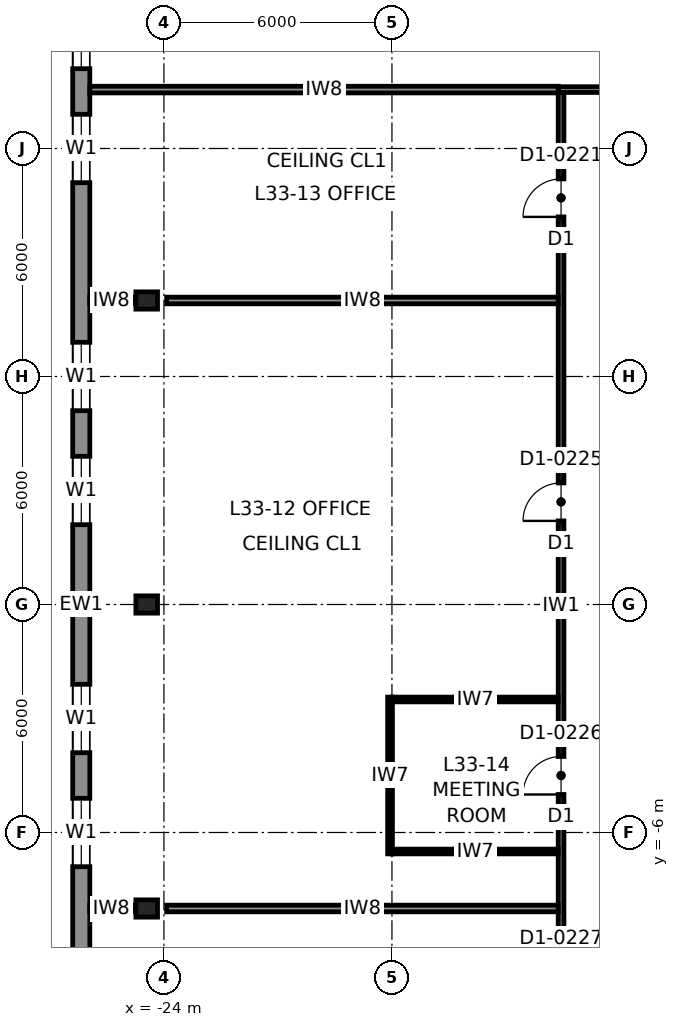
"""IFC4 building model, lengths in metres.
Left out: names, types, materials, properties, quantities, classifications, styles, units other than length and angle.
Written with IfcOpenShell. Run it as: python <this file> out.ifc"""

import sys

from ifc_helpers import new_model, si_unit, direction, frame, frame_2d, origin, origin_2d, place, context, subcontext, project, spatial, rectangle, i_section, extrude, element, fill, save


model = new_model("IFC4")
c1 = context("Model", 3, precision=1e-05, world=origin(), true_north=direction((0.0, 1.0)))
c2 = subcontext(c1, "Body", "Model", "MODEL_VIEW")
j1 = project(units=[si_unit("LENGTHUNIT", "METRE"), si_unit("PLANEANGLEUNIT", "RADIAN")], contexts=[c1])
p1 = place(None, origin())
s1 = spatial("IfcSite", under=j1, at=p1, CompositionType="ELEMENT")
p2 = place(p1, origin())
s2 = spatial("IfcBuilding", under=s1, at=p2, CompositionType="ELEMENT")
p3 = place(p2, frame((0.0, 0.0, 159.8)))
s3 = spatial("IfcBuildingStorey", under=s2, at=p3, CompositionType="ELEMENT", Elevation=159.8)
for number, where, z_axis, x_axis in (
    (1, (-24.453, 0.0, 0.0), (0.04, 0.0, 0.999), (0.0, 1.0, 0.0)),
    (2, (-24.453, 8.0, 0.0), (0.04, 0.0, 0.999), (0.0, 1.0, 0.0)),
    (3, (-24.453, -8.0, 0.0), (0.04, 0.0, 0.999), (0.0, 1.0, 0.0)),
):
    element("IfcColumn", number, at=place(p3, frame(where, z_axis=z_axis, x_axis=x_axis)), inside=s3, PredefinedType="COLUMN", context=c2, shape_type="SweptSolid", body=[
        extrude(i_section(OverallWidth=0.454, OverallDepth=0.569, WebThickness=0.078, FlangeThickness=0.125, at=origin_2d()), origin(), (0.0, 0.0, 1.0), 4.003),
    ])
p4 = place(p3, frame((-26.175, 21.9, 0.0), z_axis=(0.0, 0.0, 1.0), x_axis=(0.0, -1.0, 0.0)))
e4 = element("IfcWall", 4, at=p4, inside=s3, PredefinedType="SOLIDWALL", context=c2, shape_type="SweptSolid", body=[
    extrude(rectangle(XDim=43.8, YDim=0.45, at=frame_2d((21.9, 0.0))), origin(), (0.0, 0.0, 1.0), 3.83),
])
p5 = place(p4, frame((6.0, 0.0, 0.7)))
e5 = element("IfcOpeningElement", 5, at=p5, cuts=e4, PredefinedType="OPENING", context=c2, shape_type="SweptSolid", body=[
    extrude(rectangle(XDim=1.8, YDim=2.6, at=frame_2d((0.9, 1.3))), frame((0.0, 0.235, 0.0), z_axis=(0.0, -1.0, 0.0), x_axis=(1.0, 0.0, 0.0)), (0.0, 0.0, 1.0), 0.47),
])
p6 = place(p4, frame((9.0, 0.0, 0.7)))
e6 = element("IfcOpeningElement", 6, at=p6, cuts=e4, PredefinedType="OPENING", context=c2, shape_type="SweptSolid", body=[
    extrude(rectangle(XDim=1.8, YDim=2.6, at=frame_2d((0.9, 1.3))), frame((0.0, 0.235, 0.0), z_axis=(0.0, -1.0, 0.0), x_axis=(1.0, 0.0, 0.0)), (0.0, 0.0, 1.0), 0.47),
])
p7 = place(p4, frame((15.0, 0.0, 0.7)))
e7 = element("IfcOpeningElement", 7, at=p7, cuts=e4, PredefinedType="OPENING", context=c2, shape_type="SweptSolid", body=[
    extrude(rectangle(XDim=1.8, YDim=2.6, at=frame_2d((0.9, 1.3))), frame((0.0, 0.235, 0.0), z_axis=(0.0, -1.0, 0.0), x_axis=(1.0, 0.0, 0.0)), (0.0, 0.0, 1.0), 0.47),
])
p8 = place(p4, frame((18.0, 0.0, 0.7)))
e8 = element("IfcOpeningElement", 8, at=p8, cuts=e4, PredefinedType="OPENING", context=c2, shape_type="SweptSolid", body=[
    extrude(rectangle(XDim=1.8, YDim=2.6, at=frame_2d((0.9, 1.3))), frame((0.0, 0.235, 0.0), z_axis=(0.0, -1.0, 0.0), x_axis=(1.0, 0.0, 0.0)), (0.0, 0.0, 1.0), 0.47),
])
p9 = place(p4, frame((24.0, 0.0, 0.7)))
e9 = element("IfcOpeningElement", 9, at=p9, cuts=e4, PredefinedType="OPENING", context=c2, shape_type="SweptSolid", body=[
    extrude(rectangle(XDim=1.8, YDim=2.6, at=frame_2d((0.9, 1.3))), frame((0.0, 0.235, 0.0), z_axis=(0.0, -1.0, 0.0), x_axis=(1.0, 0.0, 0.0)), (0.0, 0.0, 1.0), 0.47),
])
p10 = place(p4, frame((27.0, 0.0, 0.7)))
e10 = element("IfcOpeningElement", 10, at=p10, cuts=e4, PredefinedType="OPENING", context=c2, shape_type="SweptSolid", body=[
    extrude(rectangle(XDim=1.8, YDim=2.6, at=frame_2d((0.9, 1.3))), frame((0.0, 0.235, 0.0), z_axis=(0.0, -1.0, 0.0), x_axis=(1.0, 0.0, 0.0)), (0.0, 0.0, 1.0), 0.47),
])
p11 = place(p4, frame((33.0, 0.0, 0.7)))
e11 = element("IfcOpeningElement", 11, at=p11, cuts=e4, PredefinedType="OPENING", context=c2, shape_type="SweptSolid", body=[
    extrude(rectangle(XDim=1.8, YDim=2.6, at=frame_2d((0.9, 1.3))), frame((0.0, 0.235, 0.0), z_axis=(0.0, -1.0, 0.0), x_axis=(1.0, 0.0, 0.0)), (0.0, 0.0, 1.0), 0.47),
])
p12 = place(p4, frame((36.0, 0.0, 0.7)))
e12 = element("IfcOpeningElement", 12, at=p12, cuts=e4, PredefinedType="OPENING", context=c2, shape_type="SweptSolid", body=[
    extrude(rectangle(XDim=1.8, YDim=2.6, at=frame_2d((0.9, 1.3))), frame((0.0, 0.235, 0.0), z_axis=(0.0, -1.0, 0.0), x_axis=(1.0, 0.0, 0.0)), (0.0, 0.0, 1.0), 0.47),
])
p13 = place(p3, frame((-13.625, 13.55, 0.0), z_axis=(0.0, 0.0, 1.0), x_axis=(1.0, 0.0, 0.0)))
e13 = element("IfcWall", 13, at=p13, inside=s3, PredefinedType="PARTITIONING", context=c2, shape_type="SweptSolid", body=[
    extrude(rectangle(XDim=27.25, YDim=0.15, at=frame_2d((13.625, 0.0))), origin(), (0.0, 0.0, 1.0), 3.83),
])
p14 = place(p13, frame((2.425, 0.0, 0.0)))
e14 = element("IfcOpeningElement", 14, at=p14, cuts=e13, PredefinedType="OPENING", context=c2, shape_type="SweptSolid", body=[
    extrude(rectangle(XDim=1.0, YDim=2.3, at=frame_2d((0.5, 1.15))), frame((0.0, 0.085, 0.0), z_axis=(0.0, -1.0, 0.0), x_axis=(1.0, 0.0, 0.0)), (0.0, 0.0, 1.0), 0.17),
])
p15 = place(p13, frame((9.125, 0.0, 0.0)))
e15 = element("IfcOpeningElement", 15, at=p15, cuts=e13, PredefinedType="OPENING", context=c2, shape_type="SweptSolid", body=[
    extrude(rectangle(XDim=1.0, YDim=2.3, at=frame_2d((0.5, 1.15))), frame((0.0, 0.085, 0.0), z_axis=(0.0, -1.0, 0.0), x_axis=(1.0, 0.0, 0.0)), (0.0, 0.0, 1.0), 0.17),
])
p16 = place(p13, frame((17.125, 0.0, 0.0)))
e16 = element("IfcOpeningElement", 16, at=p16, cuts=e13, PredefinedType="OPENING", context=c2, shape_type="SweptSolid", body=[
    extrude(rectangle(XDim=1.0, YDim=2.3, at=frame_2d((0.5, 1.15))), frame((0.0, 0.085, 0.0), z_axis=(0.0, -1.0, 0.0), x_axis=(1.0, 0.0, 0.0)), (0.0, 0.0, 1.0), 0.17),
])
p17 = place(p13, frame((23.825, 0.0, 0.0)))
e17 = element("IfcOpeningElement", 17, at=p17, cuts=e13, PredefinedType="OPENING", context=c2, shape_type="SweptSolid", body=[
    extrude(rectangle(XDim=1.0, YDim=2.3, at=frame_2d((0.5, 1.15))), frame((0.0, 0.085, 0.0), z_axis=(0.0, -1.0, 0.0), x_axis=(1.0, 0.0, 0.0)), (0.0, 0.0, 1.0), 0.17),
])
p18 = place(p3, frame((-13.55, 13.475, 0.0), z_axis=(0.0, 0.0, 1.0), x_axis=(0.0, -1.0, 0.0)))
e18 = element("IfcWall", 18, at=p18, inside=s3, PredefinedType="PARTITIONING", context=c2, shape_type="SweptSolid", body=[
    extrude(rectangle(XDim=27.05, YDim=0.15, at=frame_2d((13.525, 0.0))), origin(), (0.0, 0.0, 1.0), 3.83),
])
p19 = place(p18, frame((22.875, 0.0, 0.0)))
e19 = element("IfcOpeningElement", 19, at=p19, cuts=e18, PredefinedType="OPENING", context=c2, shape_type="SweptSolid", body=[
    extrude(rectangle(XDim=1.0, YDim=2.3, at=frame_2d((0.5, 1.15))), frame((0.0, 0.085, 0.0), z_axis=(0.0, -1.0, 0.0), x_axis=(1.0, 0.0, 0.0)), (0.0, 0.0, 1.0), 0.17),
])
p20 = place(p18, frame((10.275, 0.0, 0.0)))
e20 = element("IfcOpeningElement", 20, at=p20, cuts=e18, PredefinedType="OPENING", context=c2, shape_type="SweptSolid", body=[
    extrude(rectangle(XDim=1.0, YDim=2.3, at=frame_2d((0.5, 1.15))), frame((0.0, 0.085, 0.0), z_axis=(0.0, -1.0, 0.0), x_axis=(1.0, 0.0, 0.0)), (0.0, 0.0, 1.0), 0.17),
])
p21 = place(p18, frame((2.275, 0.0, 0.0)))
e21 = element("IfcOpeningElement", 21, at=p21, cuts=e18, PredefinedType="OPENING", context=c2, shape_type="SweptSolid", body=[
    extrude(rectangle(XDim=1.0, YDim=2.3, at=frame_2d((0.5, 1.15))), frame((0.0, 0.085, 0.0), z_axis=(0.0, -1.0, 0.0), x_axis=(1.0, 0.0, 0.0)), (0.0, 0.0, 1.0), 0.17),
])
p22 = place(p18, frame((17.475, 0.0, 0.0)))
e22 = element("IfcOpeningElement", 22, at=p22, cuts=e18, PredefinedType="OPENING", context=c2, shape_type="SweptSolid", body=[
    extrude(rectangle(XDim=1.0, YDim=2.3, at=frame_2d((0.5, 1.15))), frame((0.0, 0.085, 0.0), z_axis=(0.0, -1.0, 0.0), x_axis=(1.0, 0.0, 0.0)), (0.0, 0.0, 1.0), 0.17),
])
p23 = place(p3, frame((-25.95, 13.55, 0.0), z_axis=(0.0, 0.0, 1.0), x_axis=(1.0, 0.0, 0.0)))
e23 = element("IfcWall", 23, at=p23, inside=s3, PredefinedType="PARTITIONING", context=c2, shape_type="SweptSolid", body=[
    extrude(rectangle(XDim=12.325, YDim=0.175, at=frame_2d((6.163, 0.0))), origin(), (0.0, 0.0, 1.0), 3.83),
])
p24 = place(p3, frame((-13.625, -8.0, 0.0), z_axis=(0.0, 0.0, 1.0), x_axis=(-1.0, 0.0, 0.0)))
e24 = element("IfcWall", 24, at=p24, inside=s3, PredefinedType="PARTITIONING", context=c2, shape_type="SweptSolid", body=[
    extrude(rectangle(XDim=10.303, YDim=0.175, at=frame_2d((5.151, 0.0))), origin(), (0.0, 0.0, 1.0), 2.84),
])
p25 = place(p3, frame((-24.817, -8.0, 0.0), z_axis=(0.0, 0.0, 1.0), x_axis=(-1.0, 0.0, 0.0)))
e25 = element("IfcWall", 25, at=p25, inside=s3, PredefinedType="PARTITIONING", context=c2, shape_type="SweptSolid", body=[
    extrude(rectangle(XDim=1.133, YDim=0.175, at=frame_2d((0.566, 0.0))), origin(), (0.0, 0.0, 1.0), 3.83),
])
p26 = place(p3, frame((-13.625, 8.0, 0.0), z_axis=(0.0, 0.0, 1.0), x_axis=(-1.0, 0.0, 0.0)))
e26 = element("IfcWall", 26, at=p26, inside=s3, PredefinedType="PARTITIONING", context=c2, shape_type="SweptSolid", body=[
    extrude(rectangle(XDim=10.303, YDim=0.175, at=frame_2d((5.151, 0.0))), origin(), (0.0, 0.0, 1.0), 2.84),
])
p27 = place(p3, frame((-24.817, 8.0, 0.0), z_axis=(0.0, 0.0, 1.0), x_axis=(-1.0, 0.0, 0.0)))
e27 = element("IfcWall", 27, at=p27, inside=s3, PredefinedType="PARTITIONING", context=c2, shape_type="SweptSolid", body=[
    extrude(rectangle(XDim=1.133, YDim=0.175, at=frame_2d((0.566, 0.0))), origin(), (0.0, 0.0, 1.0), 3.83),
])
p28 = place(p3, frame((-18.05, -6.562, 0.0), z_axis=(0.0, 0.0, 1.0), x_axis=(0.0, 1.0, 0.0)))
e28 = element("IfcWall", 28, at=p28, inside=s3, PredefinedType="PARTITIONING", context=c2, shape_type="SweptSolid", body=[
    extrude(rectangle(XDim=4.125, YDim=0.125, at=frame_2d((2.062, 0.0))), origin(), (0.0, 0.0, 1.0), 3.83),
])
for number, where, z_axis, x_axis in (
    (29, (-13.625, -6.5, 0.0), (0.0, 0.0, 1.0), (-1.0, 0.0, 0.0)),
    (30, (-13.625, -2.5, 0.0), (0.0, 0.0, 1.0), (-1.0, 0.0, 0.0)),
):
    element("IfcWall", number, at=place(p3, frame(where, z_axis=z_axis, x_axis=x_axis)), inside=s3, PredefinedType="PARTITIONING", context=c2, shape_type="SweptSolid", body=[
        extrude(rectangle(XDim=4.363, YDim=0.125, at=frame_2d((2.181, 0.0))), origin(), (0.0, 0.0, 1.0), 3.83),
    ])
p29 = place(p5, origin())
e31 = element("IfcWindow", 31, at=p29, inside=s3, PartitioningType="SINGLE_PANEL", PredefinedType="WINDOW", context=c2, shape_type="SweptSolid", body=[
    extrude(rectangle(XDim=1.8, YDim=2.6, at=frame_2d((0.9, 1.3))), frame((0.0, 0.03, 0.0), z_axis=(0.0, -1.0, 0.0), x_axis=(1.0, 0.0, 0.0)), (0.0, 0.0, 1.0), 0.06),
])
fill(e5, e31)
p30 = place(p6, origin())
e32 = element("IfcWindow", 32, at=p30, inside=s3, PartitioningType="SINGLE_PANEL", PredefinedType="WINDOW", context=c2, shape_type="SweptSolid", body=[
    extrude(rectangle(XDim=1.8, YDim=2.6, at=frame_2d((0.9, 1.3))), frame((0.0, 0.03, 0.0), z_axis=(0.0, -1.0, 0.0), x_axis=(1.0, 0.0, 0.0)), (0.0, 0.0, 1.0), 0.06),
])
fill(e6, e32)
p31 = place(p7, origin())
e33 = element("IfcWindow", 33, at=p31, inside=s3, PartitioningType="SINGLE_PANEL", PredefinedType="WINDOW", context=c2, shape_type="SweptSolid", body=[
    extrude(rectangle(XDim=1.8, YDim=2.6, at=frame_2d((0.9, 1.3))), frame((0.0, 0.03, 0.0), z_axis=(0.0, -1.0, 0.0), x_axis=(1.0, 0.0, 0.0)), (0.0, 0.0, 1.0), 0.06),
])
fill(e7, e33)
p32 = place(p8, origin())
e34 = element("IfcWindow", 34, at=p32, inside=s3, PartitioningType="SINGLE_PANEL", PredefinedType="WINDOW", context=c2, shape_type="SweptSolid", body=[
    extrude(rectangle(XDim=1.8, YDim=2.6, at=frame_2d((0.9, 1.3))), frame((0.0, 0.03, 0.0), z_axis=(0.0, -1.0, 0.0), x_axis=(1.0, 0.0, 0.0)), (0.0, 0.0, 1.0), 0.06),
])
fill(e8, e34)
p33 = place(p9, origin())
e35 = element("IfcWindow", 35, at=p33, inside=s3, PartitioningType="SINGLE_PANEL", PredefinedType="WINDOW", context=c2, shape_type="SweptSolid", body=[
    extrude(rectangle(XDim=1.8, YDim=2.6, at=frame_2d((0.9, 1.3))), frame((0.0, 0.03, 0.0), z_axis=(0.0, -1.0, 0.0), x_axis=(1.0, 0.0, 0.0)), (0.0, 0.0, 1.0), 0.06),
])
fill(e9, e35)
p34 = place(p10, origin())
e36 = element("IfcWindow", 36, at=p34, inside=s3, PartitioningType="SINGLE_PANEL", PredefinedType="WINDOW", context=c2, shape_type="SweptSolid", body=[
    extrude(rectangle(XDim=1.8, YDim=2.6, at=frame_2d((0.9, 1.3))), frame((0.0, 0.03, 0.0), z_axis=(0.0, -1.0, 0.0), x_axis=(1.0, 0.0, 0.0)), (0.0, 0.0, 1.0), 0.06),
])
fill(e10, e36)
p35 = place(p20, frame((1.0, 0.0, 0.0), z_axis=(0.0, 0.0, 1.0), x_axis=(-1.0, 0.0, 0.0)))
e37 = element("IfcDoor", 37, at=p35, inside=s3, OperationType="SINGLE_SWING_LEFT", PredefinedType="DOOR", context=c2, shape_type="SweptSolid", body=[
    extrude(rectangle(XDim=1.0, YDim=2.3, at=frame_2d((0.5, 1.15))), frame((0.0, 0.025, 0.0), z_axis=(0.0, -1.0, 0.0), x_axis=(1.0, 0.0, 0.0)), (0.0, 0.0, 1.0), 0.05),
])
fill(e20, e37)
p36 = place(p21, frame((1.0, 0.0, 0.0), z_axis=(0.0, 0.0, 1.0), x_axis=(-1.0, 0.0, 0.0)))
e38 = element("IfcDoor", 38, at=p36, inside=s3, OperationType="SINGLE_SWING_LEFT", PredefinedType="DOOR", context=c2, shape_type="SweptSolid", body=[
    extrude(rectangle(XDim=1.0, YDim=2.3, at=frame_2d((0.5, 1.15))), frame((0.0, 0.025, 0.0), z_axis=(0.0, -1.0, 0.0), x_axis=(1.0, 0.0, 0.0)), (0.0, 0.0, 1.0), 0.05),
])
fill(e21, e38)
p37 = place(p22, frame((1.0, 0.0, 0.0), z_axis=(0.0, 0.0, 1.0), x_axis=(-1.0, 0.0, 0.0)))
e39 = element("IfcDoor", 39, at=p37, inside=s3, OperationType="SINGLE_SWING_LEFT", PredefinedType="DOOR", context=c2, shape_type="SweptSolid", body=[
    extrude(rectangle(XDim=1.0, YDim=2.3, at=frame_2d((0.5, 1.15))), frame((0.0, 0.025, 0.0), z_axis=(0.0, -1.0, 0.0), x_axis=(1.0, 0.0, 0.0)), (0.0, 0.0, 1.0), 0.05),
])
fill(e22, e39)
save(model, sys.argv[1])
